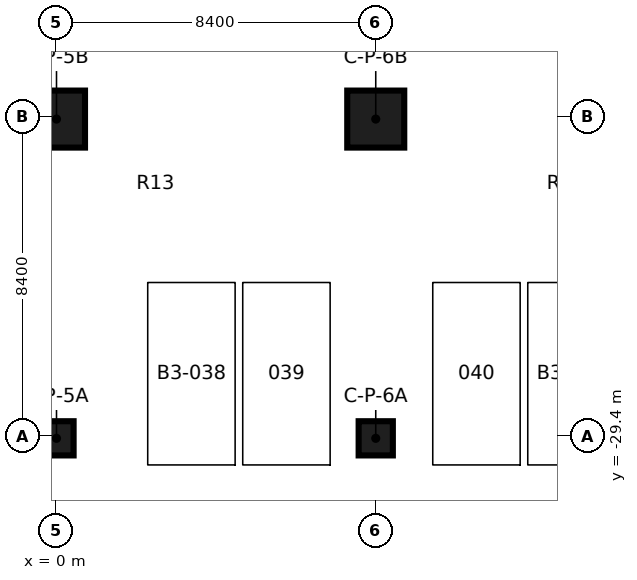
"""IFC4 building model, lengths in metres.
Left out: names, types, materials, properties, quantities, classifications, styles, units other than length and angle.
Written with IfcOpenShell. Run it as: python <this file> out.ifc"""

import sys

from ifc_helpers import new_model, si_unit, direction, frame, origin, origin_2d, place, context, subcontext, project, spatial, rectangle, extrude, element, save


model = new_model("IFC4")
c1 = context("Model", 3, precision=1e-05, world=origin(), true_north=direction((0.0, 1.0)))
c2 = subcontext(c1, "Body", "Model", "MODEL_VIEW")
j1 = project(units=[si_unit("LENGTHUNIT", "METRE"), si_unit("PLANEANGLEUNIT", "RADIAN")], contexts=[c1])
p1 = place(None, origin())
s1 = spatial("IfcSite", under=j1, at=p1, CompositionType="ELEMENT")
p2 = place(p1, origin())
s2 = spatial("IfcBuilding", under=s1, at=p2, CompositionType="ELEMENT")
p3 = place(p2, frame((0.0, 0.0, -13.0)))
s3 = spatial("IfcBuildingStorey", under=s2, at=p3, CompositionType="ELEMENT", Elevation=-13.0)
p4 = place(p3, frame((0.0, -29.4, 0.0), z_axis=(0.0, 0.0, 1.0), x_axis=(1.0, 0.0, 0.0)))
e1 = element("IfcColumn", 1, at=p4, inside=s3, PredefinedType="COLUMN", context=c2, shape_type="SweptSolid", body=[
    extrude(rectangle(XDim=0.9, YDim=0.9, at=origin_2d()), origin(), (0.0, 0.0, 1.0), 3.7),
])
p5 = place(p3, frame((0.0, -21.0, 0.0), z_axis=(0.0, 0.0, 1.0), x_axis=(1.0, 0.0, 0.0)))
e2 = element("IfcColumn", 2, at=p5, inside=s3, PredefinedType="COLUMN", context=c2, shape_type="SweptSolid", body=[
    extrude(rectangle(XDim=1.5, YDim=1.5, at=origin_2d()), origin(), (0.0, 0.0, 1.0), 3.7),
])
p6 = place(p3, frame((8.4, -29.4, 0.0), z_axis=(0.0, 0.0, 1.0), x_axis=(1.0, 0.0, 0.0)))
e3 = element("IfcColumn", 3, at=p6, inside=s3, PredefinedType="COLUMN", context=c2, shape_type="SweptSolid", body=[
    extrude(rectangle(XDim=0.9, YDim=0.9, at=origin_2d()), origin(), (0.0, 0.0, 1.0), 3.7),
])
p7 = place(p3, frame((8.4, -21.0, 0.0), z_axis=(0.0, 0.0, 1.0), x_axis=(1.0, 0.0, 0.0)))
e4 = element("IfcColumn", 4, at=p7, inside=s3, PredefinedType="COLUMN", context=c2, shape_type="SweptSolid", body=[
    extrude(rectangle(XDim=1.5, YDim=1.5, at=origin_2d()), origin(), (0.0, 0.0, 1.0), 3.7),
])
save(model, sys.argv[1])
